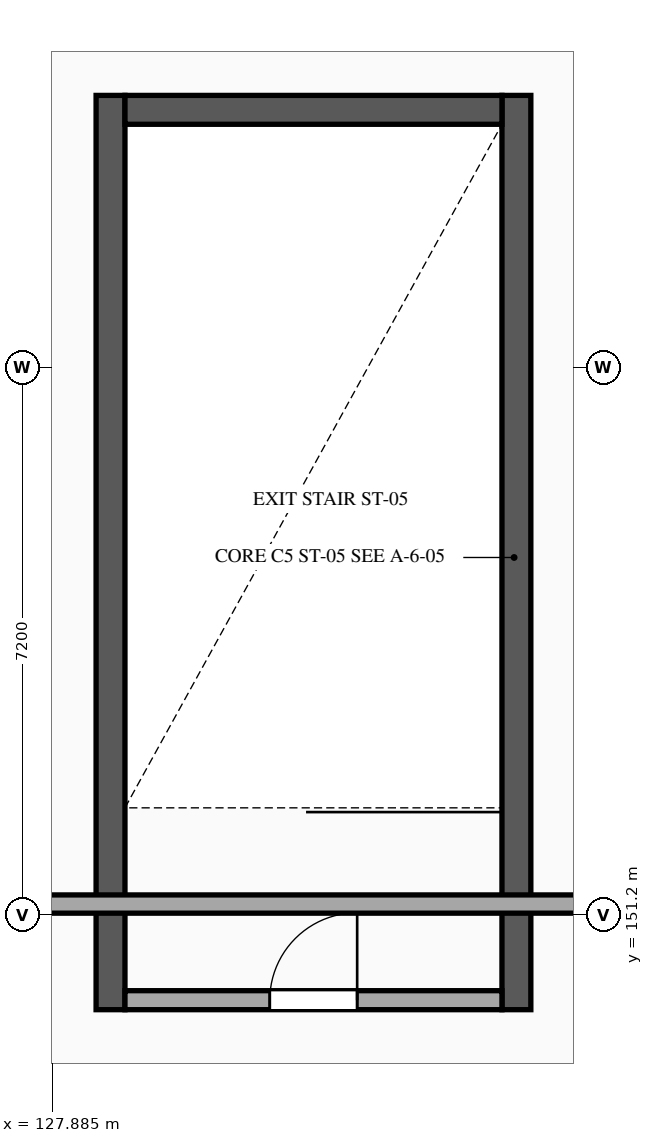
"""IFC4 building model, lengths in metres.
Left out: names, types, materials, properties, quantities, classifications, styles, units other than length and angle.
Written with IfcOpenShell. Run it as: python <this file> out.ifc"""

import sys

from ifc_helpers import new_model, si_unit, direction, frame, frame_2d, origin, place, context, subcontext, project, spatial, rectangle, extrude, element, fill, save


model = new_model("IFC4")
c1 = context("Model", 3, precision=1e-05, world=origin(), true_north=direction((0.0, 1.0)))
c2 = subcontext(c1, "Body", "Model", "MODEL_VIEW")
j1 = project(units=[si_unit("LENGTHUNIT", "METRE"), si_unit("PLANEANGLEUNIT", "RADIAN")], contexts=[c1])
p1 = place(None, origin())
s1 = spatial("IfcSite", under=j1, at=p1, CompositionType="ELEMENT")
p2 = place(p1, origin())
s2 = spatial("IfcBuilding", under=s1, at=p2, CompositionType="ELEMENT")
p3 = place(p2, frame((0.0, 0.0, 15.3)))
s3 = spatial("IfcBuildingStorey", under=s2, at=p3, CompositionType="ELEMENT", Elevation=15.3)
for number, where, z_axis, x_axis in (
    (1, (128.65, 149.95, 0.0), (0.0, 0.0, 1.0), (0.0, 1.0, 0.0)),
    (2, (133.99, 161.98, 0.0), (0.0, 0.0, 1.0), (0.0, -1.0, 0.0)),
):
    element("IfcWall", number, at=place(p3, frame(where, z_axis=z_axis, x_axis=x_axis)), inside=s3, PredefinedType="SHEAR", context=c2, shape_type="SweptSolid", body=[
        extrude(rectangle(XDim=12.03, YDim=0.38, at=frame_2d((6.015, 0.0))), origin(), (0.0, 0.0, 1.0), 4.2),
    ])
p4 = place(p3, frame((128.84, 161.79, 0.0), z_axis=(0.0, 0.0, 1.0), x_axis=(1.0, 0.0, 0.0)))
e3 = element("IfcWall", 3, at=p4, inside=s3, PredefinedType="SHEAR", context=c2, shape_type="SweptSolid", body=[
    extrude(rectangle(XDim=4.96, YDim=0.38, at=frame_2d((2.48, 0.0))), origin(), (0.0, 0.0, 1.0), 4.2),
])
p5 = place(p3, frame((135.0, 151.34, 4.5), z_axis=(0.0, 0.0, 1.0), x_axis=(-1.0, 0.0, 0.0)))
e4 = element("IfcWall", 4, at=p5, inside=s3, PredefinedType="PARAPET", context=c2, shape_type="SweptSolid", body=[
    extrude(rectangle(XDim=35.86, YDim=0.24, at=frame_2d((17.93, 0.0))), origin(), (0.0, 0.0, 1.0), 0.65),
])
p6 = place(p3, frame((128.84, 150.075, 0.0), z_axis=(0.0, 0.0, 1.0), x_axis=(1.0, 0.0, 0.0)))
e5 = element("IfcWall", 5, at=p6, inside=s3, PredefinedType="STANDARD", context=c2, shape_type="SweptSolid", body=[
    extrude(rectangle(XDim=4.96, YDim=0.25, at=frame_2d((2.48, 0.0))), origin(), (0.0, 0.0, 1.0), 4.2),
])
p7 = place(p6, frame((1.905, 0.0, 0.0)))
e6 = element("IfcOpeningElement", 6, at=p7, cuts=e5, PredefinedType="OPENING", context=c2, shape_type="SweptSolid", body=[
    extrude(rectangle(XDim=1.15, YDim=2.2, at=frame_2d((0.575, 1.1))), frame((0.0, 0.135, 0.0), z_axis=(0.0, -1.0, 0.0), x_axis=(1.0, 0.0, 0.0)), (0.0, 0.0, 1.0), 0.27),
])
p8 = place(p7, origin())
e7 = element("IfcDoor", 7, at=p8, inside=s3, OperationType="SINGLE_SWING_RIGHT", PredefinedType="DOOR", context=c2, shape_type="SweptSolid", body=[
    extrude(rectangle(XDim=1.15, YDim=2.2, at=frame_2d((0.575, 1.1))), frame((0.0, 0.025, 0.0), z_axis=(0.0, -1.0, 0.0), x_axis=(1.0, 0.0, 0.0)), (0.0, 0.0, 1.0), 0.05),
])
fill(e6, e7)
save(model, sys.argv[1])
